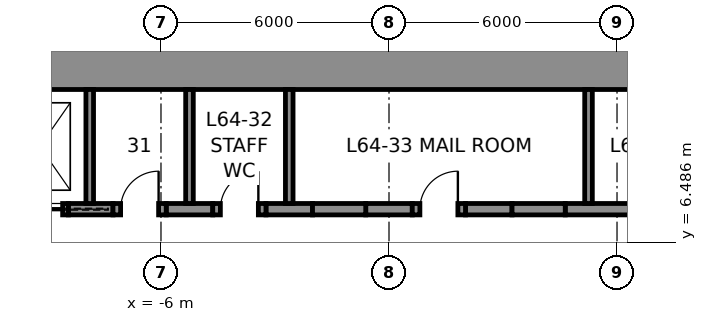
"""IFC4 building model, lengths in metres.
Left out: names, types, materials, properties, quantities, classifications, styles, units other than length and angle.
Written with IfcOpenShell. Run it as: python <this file> out.ifc"""

import sys

from ifc_helpers import new_model, si_unit, direction, frame, frame_2d, origin, place, context, subcontext, project, spatial, rectangle, extrude, element, fill, save


model = new_model("IFC4")
c1 = context("Model", 3, precision=1e-05, world=origin(), true_north=direction((0.0, 1.0)))
c2 = subcontext(c1, "Body", "Model", "MODEL_VIEW")
j1 = project(units=[si_unit("LENGTHUNIT", "METRE"), si_unit("PLANEANGLEUNIT", "RADIAN")], contexts=[c1])
p1 = place(None, origin())
s1 = spatial("IfcSite", under=j1, at=p1, CompositionType="ELEMENT")
p2 = place(p1, origin())
s2 = spatial("IfcBuilding", under=s1, at=p2, CompositionType="ELEMENT")
p3 = place(p2, frame((0.0, 0.0, 285.8)))
s3 = spatial("IfcBuildingStorey", under=s2, at=p3, CompositionType="ELEMENT", Elevation=285.8)
p4 = place(p3, frame((-12.0, 11.25, 0.0), z_axis=(0.0, 0.0, 1.0), x_axis=(1.0, 0.0, 0.0)))
e1 = element("IfcWall", 1, at=p4, inside=s3, PredefinedType="SHEAR", context=c2, shape_type="SweptSolid", body=[
    extrude(rectangle(XDim=24.0, YDim=1.5, at=frame_2d((12.0, 0.0))), origin(), (0.0, 0.0, 1.0), 4.0),
])
p5 = place(p3, frame((-8.438, 7.35, 0.0), z_axis=(0.0, 0.0, 1.0), x_axis=(1.0, 0.0, 0.0)))
e2 = element("IfcWall", 2, at=p5, inside=s3, PredefinedType="SHEAR", context=c2, shape_type="SweptSolid", body=[
    extrude(rectangle(XDim=1.175, YDim=0.3, at=frame_2d((0.587, 0.0))), origin(), (0.0, 0.0, 1.0), 4.0),
])
for number, where, z_axis, x_axis in (
    (3, (-5.863, 7.35, 0.0), (0.0, 0.0, 1.0), (1.0, 0.0, 0.0)),
    (4, (-3.238, 7.35, 0.0), (0.0, 0.0, 1.0), (1.0, 0.0, 0.0)),
    (5, (-0.613, 7.35, 0.0), (0.0, 0.0, 1.0), (1.0, 0.0, 0.0)),
    (6, (2.012, 7.35, 0.0), (0.0, 0.0, 1.0), (1.0, 0.0, 0.0)),
):
    element("IfcWall", number, at=place(p3, frame(where, z_axis=z_axis, x_axis=x_axis)), inside=s3, PredefinedType="SHEAR", context=c2, shape_type="SweptSolid", body=[
        extrude(rectangle(XDim=1.225, YDim=0.3, at=frame_2d((0.613, 0.0))), origin(), (0.0, 0.0, 1.0), 4.0),
    ])
p6 = place(p3, frame((4.637, 7.35, 0.0), z_axis=(0.0, 0.0, 1.0), x_axis=(1.0, 0.0, 0.0)))
e7 = element("IfcWall", 7, at=p6, inside=s3, PredefinedType="SHEAR", context=c2, shape_type="SweptSolid", body=[
    extrude(rectangle(XDim=1.887, YDim=0.3, at=frame_2d((0.944, 0.0))), origin(), (0.0, 0.0, 1.0), 4.0),
])
p7 = place(p3, frame((-9.938, 7.35, 0.0), z_axis=(0.0, 0.0, 1.0), x_axis=(1.0, 0.0, 0.0)))
e8 = element("IfcWall", 8, at=p7, inside=s3, PredefinedType="PARTITIONING", context=c2, shape_type="SweptSolid", body=[
    extrude(rectangle(XDim=1.5, YDim=0.3, at=frame_2d((0.75, 0.0))), origin(), (0.0, 0.0, 1.0), 4.0),
])
p8 = place(p7, frame((0.15, 0.0, 0.0)))
e9 = element("IfcOpeningElement", 9, at=p8, cuts=e8, PredefinedType="OPENING", context=c2, shape_type="SweptSolid", body=[
    extrude(rectangle(XDim=1.2, YDim=2.3, at=frame_2d((0.6, 1.15))), frame((0.0, 0.16, 0.0), z_axis=(0.0, -1.0, 0.0), x_axis=(1.0, 0.0, 0.0)), (0.0, 0.0, 1.0), 0.32),
])
p9 = place(p3, frame((-7.262, 7.35, 0.0), z_axis=(0.0, 0.0, 1.0), x_axis=(1.0, 0.0, 0.0)))
e10 = element("IfcWall", 10, at=p9, inside=s3, PredefinedType="PARTITIONING", context=c2, shape_type="SweptSolid", body=[
    extrude(rectangle(XDim=1.4, YDim=0.3, at=frame_2d((0.7, 0.0))), origin(), (0.0, 0.0, 1.0), 4.0),
])
p10 = place(p9, frame((0.2, 0.0, 0.0)))
e11 = element("IfcOpeningElement", 11, at=p10, cuts=e10, PredefinedType="OPENING", context=c2, shape_type="SweptSolid", body=[
    extrude(rectangle(XDim=1.0, YDim=2.3, at=frame_2d((0.5, 1.15))), frame((0.0, 0.16, 0.0), z_axis=(0.0, -1.0, 0.0), x_axis=(1.0, 0.0, 0.0)), (0.0, 0.0, 1.0), 0.32),
])
p11 = place(p3, frame((-4.637, 7.35, 0.0), z_axis=(0.0, 0.0, 1.0), x_axis=(1.0, 0.0, 0.0)))
e12 = element("IfcWall", 12, at=p11, inside=s3, PredefinedType="PARTITIONING", context=c2, shape_type="SweptSolid", body=[
    extrude(rectangle(XDim=1.4, YDim=0.3, at=frame_2d((0.7, 0.0))), origin(), (0.0, 0.0, 1.0), 4.0),
])
p12 = place(p11, frame((0.2, 0.0, 0.0)))
e13 = element("IfcOpeningElement", 13, at=p12, cuts=e12, PredefinedType="OPENING", context=c2, shape_type="SweptSolid", body=[
    extrude(rectangle(XDim=1.0, YDim=2.3, at=frame_2d((0.5, 1.15))), frame((0.0, 0.16, 0.0), z_axis=(0.0, -1.0, 0.0), x_axis=(1.0, 0.0, 0.0)), (0.0, 0.0, 1.0), 0.32),
])
p13 = place(p3, frame((-2.012, 7.35, 0.0), z_axis=(0.0, 0.0, 1.0), x_axis=(1.0, 0.0, 0.0)))
e14 = element("IfcWall", 14, at=p13, inside=s3, PredefinedType="PARTITIONING", context=c2, shape_type="SweptSolid", body=[
    extrude(rectangle(XDim=1.4, YDim=0.3, at=frame_2d((0.7, 0.0))), origin(), (0.0, 0.0, 1.0), 4.0),
])
p14 = place(p3, frame((0.613, 7.35, 0.0), z_axis=(0.0, 0.0, 1.0), x_axis=(1.0, 0.0, 0.0)))
e15 = element("IfcWall", 15, at=p14, inside=s3, PredefinedType="PARTITIONING", context=c2, shape_type="SweptSolid", body=[
    extrude(rectangle(XDim=1.4, YDim=0.3, at=frame_2d((0.7, 0.0))), origin(), (0.0, 0.0, 1.0), 4.0),
])
p15 = place(p14, frame((0.2, 0.0, 0.0)))
e16 = element("IfcOpeningElement", 16, at=p15, cuts=e15, PredefinedType="OPENING", context=c2, shape_type="SweptSolid", body=[
    extrude(rectangle(XDim=1.0, YDim=2.3, at=frame_2d((0.5, 1.15))), frame((0.0, 0.16, 0.0), z_axis=(0.0, -1.0, 0.0), x_axis=(1.0, 0.0, 0.0)), (0.0, 0.0, 1.0), 0.32),
])
p16 = place(p3, frame((3.238, 7.35, 0.0), z_axis=(0.0, 0.0, 1.0), x_axis=(1.0, 0.0, 0.0)))
e17 = element("IfcWall", 17, at=p16, inside=s3, PredefinedType="PARTITIONING", context=c2, shape_type="SweptSolid", body=[
    extrude(rectangle(XDim=1.4, YDim=0.3, at=frame_2d((0.7, 0.0))), origin(), (0.0, 0.0, 1.0), 4.0),
])
for number, where, z_axis, x_axis in (
    (18, (-7.875, 7.5, 0.0), (0.0, 0.0, 1.0), (0.0, 1.0, 0.0)),
    (19, (-5.25, 7.5, 0.0), (0.0, 0.0, 1.0), (0.0, 1.0, 0.0)),
    (20, (-2.625, 7.5, 0.0), (0.0, 0.0, 1.0), (0.0, 1.0, 0.0)),
    (21, (5.25, 7.5, 0.0), (0.0, 0.0, 1.0), (0.0, 1.0, 0.0)),
):
    element("IfcWall", number, at=place(p3, frame(where, z_axis=z_axis, x_axis=x_axis)), inside=s3, PredefinedType="PARTITIONING", context=c2, shape_type="SweptSolid", body=[
        extrude(rectangle(XDim=3.0, YDim=0.2, at=frame_2d((1.5, 0.0))), origin(), (0.0, 0.0, 1.0), 4.0),
    ])
p17 = place(p10, origin())
e22 = element("IfcDoor", 22, at=p17, inside=s3, OperationType="SINGLE_SWING_RIGHT", PredefinedType="DOOR", context=c2, shape_type="SweptSolid", body=[
    extrude(rectangle(XDim=1.0, YDim=2.3, at=frame_2d((0.5, 1.15))), frame((0.0, 0.025, 0.0), z_axis=(0.0, -1.0, 0.0), x_axis=(1.0, 0.0, 0.0)), (0.0, 0.0, 1.0), 0.05),
])
fill(e11, e22)
p18 = place(p12, origin())
e23 = element("IfcDoor", 23, at=p18, inside=s3, OperationType="SINGLE_SWING_RIGHT", PredefinedType="DOOR", context=c2, shape_type="SweptSolid", body=[
    extrude(rectangle(XDim=1.0, YDim=2.3, at=frame_2d((0.5, 1.15))), frame((0.0, 0.025, 0.0), z_axis=(0.0, -1.0, 0.0), x_axis=(1.0, 0.0, 0.0)), (0.0, 0.0, 1.0), 0.05),
])
fill(e13, e23)
p19 = place(p15, origin())
e24 = element("IfcDoor", 24, at=p19, inside=s3, OperationType="SINGLE_SWING_RIGHT", PredefinedType="DOOR", context=c2, shape_type="SweptSolid", body=[
    extrude(rectangle(XDim=1.0, YDim=2.3, at=frame_2d((0.5, 1.15))), frame((0.0, 0.025, 0.0), z_axis=(0.0, -1.0, 0.0), x_axis=(1.0, 0.0, 0.0)), (0.0, 0.0, 1.0), 0.05),
])
fill(e16, e24)
p20 = place(p8, frame((1.2, 0.0, 0.0), z_axis=(0.0, 0.0, 1.0), x_axis=(-1.0, 0.0, 0.0)))
e25 = element("IfcDoor", 25, at=p20, inside=s3, OperationType="SLIDING_TO_LEFT", PredefinedType="DOOR", context=c2, shape_type="SweptSolid", body=[
    extrude(rectangle(XDim=1.2, YDim=2.3, at=frame_2d((0.6, 1.15))), frame((0.0, 0.025, 0.0), z_axis=(0.0, -1.0, 0.0), x_axis=(1.0, 0.0, 0.0)), (0.0, 0.0, 1.0), 0.05),
])
fill(e9, e25)
save(model, sys.argv[1])
